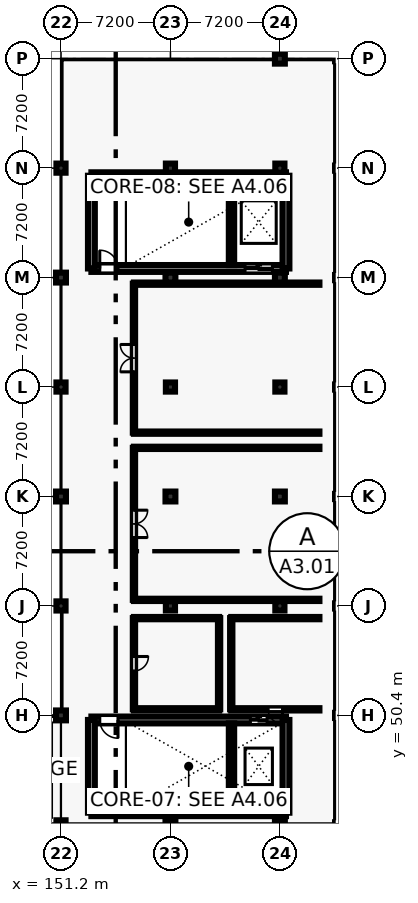
"""IFC4 building model, lengths in metres.
Left out: names, types, materials, properties, quantities, classifications, styles, units other than length and angle.
Written with IfcOpenShell. Run it as: python <this file> out.ifc"""

import sys

from ifc_helpers import new_model, si_unit, direction, frame, frame_2d, origin, origin_2d, place, context, subcontext, project, spatial, rectangle, extrude, element, fill, save


model = new_model("IFC4")
c1 = context("Model", 3, precision=1e-05, world=origin(), true_north=direction((0.0, 1.0)))
c2 = subcontext(c1, "Body", "Model", "MODEL_VIEW")
j1 = project(units=[si_unit("LENGTHUNIT", "METRE"), si_unit("PLANEANGLEUNIT", "RADIAN")], contexts=[c1])
p1 = place(None, origin())
s1 = spatial("IfcSite", under=j1, at=p1, CompositionType="ELEMENT")
p2 = place(p1, origin())
s2 = spatial("IfcBuilding", under=s1, at=p2, CompositionType="ELEMENT")
p3 = place(p2, frame((0.0, 0.0, 13.8)))
s3 = spatial("IfcBuildingStorey", under=s2, at=p3, CompositionType="ELEMENT", Elevation=13.8)
p4 = place(p3, frame((151.2, 43.2, 0.0), z_axis=(0.0, 0.0, 1.0), x_axis=(1.0, 0.0, 0.0)))
e1 = element("IfcColumn", 1, at=p4, inside=s3, PredefinedType="COLUMN", context=c2, shape_type="SweptSolid", body=[
    extrude(rectangle(XDim=0.6, YDim=0.6, at=origin_2d()), origin(), (0.0, 0.0, 1.0), 4.8),
])
p5 = place(p3, frame((151.2, 50.4, 0.0), z_axis=(0.0, 0.0, 1.0), x_axis=(1.0, 0.0, 0.0)))
e2 = element("IfcColumn", 2, at=p5, inside=s3, PredefinedType="COLUMN", context=c2, shape_type="SweptSolid", body=[
    extrude(rectangle(XDim=0.65, YDim=0.65, at=origin_2d()), origin(), (0.0, 0.0, 1.0), 4.8),
])
p6 = place(p3, frame((151.2, 57.6, 0.0), z_axis=(0.0, 0.0, 1.0), x_axis=(1.0, 0.0, 0.0)))
e3 = element("IfcColumn", 3, at=p6, inside=s3, PredefinedType="COLUMN", context=c2, shape_type="SweptSolid", body=[
    extrude(rectangle(XDim=0.6, YDim=0.6, at=origin_2d()), origin(), (0.0, 0.0, 1.0), 4.8),
])
p7 = place(p3, frame((151.2, 64.8, 0.0), z_axis=(0.0, 0.0, 1.0), x_axis=(1.0, 0.0, 0.0)))
e4 = element("IfcColumn", 4, at=p7, inside=s3, PredefinedType="COLUMN", context=c2, shape_type="SweptSolid", body=[
    extrude(rectangle(XDim=0.65, YDim=0.65, at=origin_2d()), origin(), (0.0, 0.0, 1.0), 4.8),
])
p8 = place(p3, frame((151.2, 72.0, 0.0), z_axis=(0.0, 0.0, 1.0), x_axis=(1.0, 0.0, 0.0)))
e5 = element("IfcColumn", 5, at=p8, inside=s3, PredefinedType="COLUMN", context=c2, shape_type="SweptSolid", body=[
    extrude(rectangle(XDim=0.6, YDim=0.6, at=origin_2d()), origin(), (0.0, 0.0, 1.0), 4.8),
])
p9 = place(p3, frame((151.2, 79.2, 0.0), z_axis=(0.0, 0.0, 1.0), x_axis=(1.0, 0.0, 0.0)))
e6 = element("IfcColumn", 6, at=p9, inside=s3, PredefinedType="COLUMN", context=c2, shape_type="SweptSolid", body=[
    extrude(rectangle(XDim=0.65, YDim=0.65, at=origin_2d()), origin(), (0.0, 0.0, 1.0), 4.8),
])
p10 = place(p3, frame((151.2, 86.4, 0.0), z_axis=(0.0, 0.0, 1.0), x_axis=(1.0, 0.0, 0.0)))
e7 = element("IfcColumn", 7, at=p10, inside=s3, PredefinedType="COLUMN", context=c2, shape_type="SweptSolid", body=[
    extrude(rectangle(XDim=0.6, YDim=0.6, at=origin_2d()), origin(), (0.0, 0.0, 1.0), 4.8),
])
p11 = place(p3, frame((158.4, 43.2, 0.0), z_axis=(0.0, 0.0, 1.0), x_axis=(1.0, 0.0, 0.0)))
e8 = element("IfcColumn", 8, at=p11, inside=s3, PredefinedType="COLUMN", context=c2, shape_type="SweptSolid", body=[
    extrude(rectangle(XDim=0.65, YDim=0.65, at=origin_2d()), origin(), (0.0, 0.0, 1.0), 4.8),
])
p12 = place(p3, frame((158.4, 57.6, 0.0), z_axis=(0.0, 0.0, 1.0), x_axis=(1.0, 0.0, 0.0)))
e9 = element("IfcColumn", 9, at=p12, inside=s3, PredefinedType="COLUMN", context=c2, shape_type="SweptSolid", body=[
    extrude(rectangle(XDim=0.6, YDim=0.6, at=origin_2d()), origin(), (0.0, 0.0, 1.0), 4.8),
])
p13 = place(p3, frame((158.4, 64.8, 0.0), z_axis=(0.0, 0.0, 1.0), x_axis=(1.0, 0.0, 0.0)))
e10 = element("IfcColumn", 10, at=p13, inside=s3, PredefinedType="COLUMN", context=c2, shape_type="SweptSolid", body=[
    extrude(rectangle(XDim=0.65, YDim=0.65, at=origin_2d()), origin(), (0.0, 0.0, 1.0), 4.8),
])
p14 = place(p3, frame((158.4, 72.0, 0.0), z_axis=(0.0, 0.0, 1.0), x_axis=(1.0, 0.0, 0.0)))
e11 = element("IfcColumn", 11, at=p14, inside=s3, PredefinedType="COLUMN", context=c2, shape_type="SweptSolid", body=[
    extrude(rectangle(XDim=0.6, YDim=0.6, at=origin_2d()), origin(), (0.0, 0.0, 1.0), 4.8),
])
p15 = place(p3, frame((158.4, 79.2, 0.0), z_axis=(0.0, 0.0, 1.0), x_axis=(1.0, 0.0, 0.0)))
e12 = element("IfcColumn", 12, at=p15, inside=s3, PredefinedType="COLUMN", context=c2, shape_type="SweptSolid", body=[
    extrude(rectangle(XDim=0.65, YDim=0.65, at=origin_2d()), origin(), (0.0, 0.0, 1.0), 4.8),
])
p16 = place(p3, frame((158.4, 86.4, 0.0), z_axis=(0.0, 0.0, 1.0), x_axis=(1.0, 0.0, 0.0)))
e13 = element("IfcColumn", 13, at=p16, inside=s3, PredefinedType="COLUMN", context=c2, shape_type="SweptSolid", body=[
    extrude(rectangle(XDim=0.6, YDim=0.6, at=origin_2d()), origin(), (0.0, 0.0, 1.0), 4.8),
])
p17 = place(p3, frame((165.6, 43.2, 0.0), z_axis=(0.0, 0.0, 1.0), x_axis=(1.0, 0.0, 0.0)))
e14 = element("IfcColumn", 14, at=p17, inside=s3, PredefinedType="COLUMN", context=c2, shape_type="SweptSolid", body=[
    extrude(rectangle(XDim=0.65, YDim=0.65, at=origin_2d()), origin(), (0.0, 0.0, 1.0), 4.8),
])
p18 = place(p3, frame((165.6, 57.6, 0.0), z_axis=(0.0, 0.0, 1.0), x_axis=(1.0, 0.0, 0.0)))
e15 = element("IfcColumn", 15, at=p18, inside=s3, PredefinedType="COLUMN", context=c2, shape_type="SweptSolid", body=[
    extrude(rectangle(XDim=0.6, YDim=0.6, at=origin_2d()), origin(), (0.0, 0.0, 1.0), 4.8),
])
p19 = place(p3, frame((165.6, 64.8, 0.0), z_axis=(0.0, 0.0, 1.0), x_axis=(1.0, 0.0, 0.0)))
e16 = element("IfcColumn", 16, at=p19, inside=s3, PredefinedType="COLUMN", context=c2, shape_type="SweptSolid", body=[
    extrude(rectangle(XDim=0.65, YDim=0.65, at=origin_2d()), origin(), (0.0, 0.0, 1.0), 4.8),
])
p20 = place(p3, frame((165.6, 72.0, 0.0), z_axis=(0.0, 0.0, 1.0), x_axis=(1.0, 0.0, 0.0)))
e17 = element("IfcColumn", 17, at=p20, inside=s3, PredefinedType="COLUMN", context=c2, shape_type="SweptSolid", body=[
    extrude(rectangle(XDim=0.6, YDim=0.6, at=origin_2d()), origin(), (0.0, 0.0, 1.0), 4.8),
])
p21 = place(p3, frame((165.6, 79.2, 0.0), z_axis=(0.0, 0.0, 1.0), x_axis=(1.0, 0.0, 0.0)))
e18 = element("IfcColumn", 18, at=p21, inside=s3, PredefinedType="COLUMN", context=c2, shape_type="SweptSolid", body=[
    extrude(rectangle(XDim=0.65, YDim=0.65, at=origin_2d()), origin(), (0.0, 0.0, 1.0), 4.8),
])
p22 = place(p3, frame((165.6, 86.4, 0.0), z_axis=(0.0, 0.0, 1.0), x_axis=(1.0, 0.0, 0.0)))
e19 = element("IfcColumn", 19, at=p22, inside=s3, PredefinedType="COLUMN", context=c2, shape_type="SweptSolid", body=[
    extrude(rectangle(XDim=0.6, YDim=0.6, at=origin_2d()), origin(), (0.0, 0.0, 1.0), 4.8),
])
p23 = place(p3, frame((165.6, 93.6, 0.0), z_axis=(0.0, 0.0, 1.0), x_axis=(1.0, 0.0, 0.0)))
e20 = element("IfcColumn", 20, at=p23, inside=s3, PredefinedType="COLUMN", context=c2, shape_type="SweptSolid", body=[
    extrude(rectangle(XDim=0.65, YDim=0.65, at=origin_2d()), origin(), (0.0, 0.0, 1.0), 4.8),
])
p24 = place(p3, frame((153.2, 44.0, 0.0), z_axis=(0.0, 0.0, 1.0), x_axis=(1.0, 0.0, 0.0)))
e21 = element("IfcWall", 21, at=p24, inside=s3, PredefinedType="SHEAR", context=c2, shape_type="SweptSolid", body=[
    extrude(rectangle(XDim=12.8, YDim=0.45, at=frame_2d((6.4, 0.0))), origin(), (0.0, 0.0, 1.0), 4.53),
])
p25 = place(p3, frame((153.2, 50.1, 0.0), z_axis=(0.0, 0.0, 1.0), x_axis=(1.0, 0.0, 0.0)))
e22 = element("IfcWall", 22, at=p25, inside=s3, PredefinedType="SHEAR", context=c2, shape_type="SweptSolid", body=[
    extrude(rectangle(XDim=12.8, YDim=0.45, at=frame_2d((6.4, 0.0))), origin(), (0.0, 0.0, 1.0), 4.53),
])
p26 = place(p25, frame((0.55, 0.0, 0.0)))
e23 = element("IfcOpeningElement", 23, at=p26, cuts=e22, PredefinedType="OPENING", context=c2, shape_type="SweptSolid", body=[
    extrude(rectangle(XDim=1.2, YDim=2.25, at=frame_2d((0.6, 1.125))), frame((0.0, 0.235, 0.0), z_axis=(0.0, -1.0, 0.0), x_axis=(1.0, 0.0, 0.0)), (0.0, 0.0, 1.0), 0.47),
])
p27 = place(p25, frame((10.458, 0.0, 0.0)))
e24 = element("IfcOpeningElement", 24, at=p27, cuts=e22, PredefinedType="OPENING", context=c2, shape_type="SweptSolid", body=[
    extrude(rectangle(XDim=1.1, YDim=2.2, at=frame_2d((0.55, 1.1))), frame((0.0, 0.235, 0.0), z_axis=(0.0, -1.0, 0.0), x_axis=(1.0, 0.0, 0.0)), (0.0, 0.0, 1.0), 0.47),
])
for number, where, z_axis, x_axis in (
    (25, (153.2, 44.0, 0.0), (0.0, 0.0, 1.0), (0.0, 1.0, 0.0)),
    (26, (166.0, 44.0, 0.0), (0.0, 0.0, 1.0), (0.0, 1.0, 0.0)),
):
    element("IfcWall", number, at=place(p3, frame(where, z_axis=z_axis, x_axis=x_axis)), inside=s3, PredefinedType="SHEAR", context=c2, shape_type="SweptSolid", body=[
        extrude(rectangle(XDim=6.1, YDim=0.45, at=frame_2d((3.05, 0.0))), origin(), (0.0, 0.0, 1.0), 4.53),
    ])
p28 = place(p3, frame((162.416, 44.225, 0.0), z_axis=(0.0, 0.0, 1.0), x_axis=(0.0, 1.0, 0.0)))
e27 = element("IfcWall", 27, at=p28, inside=s3, PredefinedType="SHEAR", context=c2, shape_type="SweptSolid", body=[
    extrude(rectangle(XDim=5.65, YDim=0.35, at=frame_2d((2.825, 0.0))), origin(), (0.0, 0.0, 1.0), 4.53),
])
p29 = place(p3, frame((153.2, 79.8, 0.0), z_axis=(0.0, 0.0, 1.0), x_axis=(1.0, 0.0, 0.0)))
e28 = element("IfcWall", 28, at=p29, inside=s3, PredefinedType="SHEAR", context=c2, shape_type="SweptSolid", body=[
    extrude(rectangle(XDim=12.8, YDim=0.45, at=frame_2d((6.4, 0.0))), origin(), (0.0, 0.0, 1.0), 4.53),
])
p30 = place(p29, frame((0.55, 0.0, 0.0)))
e29 = element("IfcOpeningElement", 29, at=p30, cuts=e28, PredefinedType="OPENING", context=c2, shape_type="SweptSolid", body=[
    extrude(rectangle(XDim=1.2, YDim=2.25, at=frame_2d((0.6, 1.125))), frame((0.0, 0.235, 0.0), z_axis=(0.0, -1.0, 0.0), x_axis=(1.0, 0.0, 0.0)), (0.0, 0.0, 1.0), 0.47),
])
p31 = place(p29, frame((10.108, 0.0, 0.0)))
e30 = element("IfcOpeningElement", 30, at=p31, cuts=e28, PredefinedType="OPENING", context=c2, shape_type="SweptSolid", body=[
    extrude(rectangle(XDim=1.8, YDim=2.4, at=frame_2d((0.9, 1.2))), frame((0.0, 0.235, 0.0), z_axis=(0.0, -1.0, 0.0), x_axis=(1.0, 0.0, 0.0)), (0.0, 0.0, 1.0), 0.47),
])
p32 = place(p3, frame((153.2, 85.9, 0.0), z_axis=(0.0, 0.0, 1.0), x_axis=(1.0, 0.0, 0.0)))
e31 = element("IfcWall", 31, at=p32, inside=s3, PredefinedType="SHEAR", context=c2, shape_type="SweptSolid", body=[
    extrude(rectangle(XDim=12.8, YDim=0.45, at=frame_2d((6.4, 0.0))), origin(), (0.0, 0.0, 1.0), 4.53),
])
for number, where, z_axis, x_axis in (
    (32, (153.2, 79.8, 0.0), (0.0, 0.0, 1.0), (0.0, 1.0, 0.0)),
    (33, (166.0, 79.8, 0.0), (0.0, 0.0, 1.0), (0.0, 1.0, 0.0)),
):
    element("IfcWall", number, at=place(p3, frame(where, z_axis=z_axis, x_axis=x_axis)), inside=s3, PredefinedType="SHEAR", context=c2, shape_type="SweptSolid", body=[
        extrude(rectangle(XDim=6.1, YDim=0.45, at=frame_2d((3.05, 0.0))), origin(), (0.0, 0.0, 1.0), 4.53),
    ])
p33 = place(p3, frame((162.416, 80.025, 0.0), z_axis=(0.0, 0.0, 1.0), x_axis=(0.0, 1.0, 0.0)))
e34 = element("IfcWall", 34, at=p33, inside=s3, PredefinedType="SHEAR", context=c2, shape_type="SweptSolid", body=[
    extrude(rectangle(XDim=5.65, YDim=0.35, at=frame_2d((2.825, 0.0))), origin(), (0.0, 0.0, 1.0), 4.53),
])
for number, where, z_axis, x_axis in (
    (35, (156.0, 58.0, 0.0), (0.0, 0.0, 1.0), (1.0, 0.0, 0.0)),
    (36, (168.2, 68.0, 0.0), (0.0, 0.0, 1.0), (-1.0, 0.0, 0.0)),
):
    element("IfcWall", number, at=place(p3, frame(where, z_axis=z_axis, x_axis=x_axis)), inside=s3, PredefinedType="PARTITIONING", context=c2, shape_type="SweptSolid", body=[
        extrude(rectangle(XDim=12.2, YDim=0.15, at=frame_2d((6.1, 0.0))), origin(), (0.0, 0.0, 1.0), 3.59),
    ])
p34 = place(p3, frame((156.0, 68.0, 0.0), z_axis=(0.0, 0.0, 1.0), x_axis=(0.0, -1.0, 0.0)))
e37 = element("IfcWall", 37, at=p34, inside=s3, PredefinedType="PARTITIONING", context=c2, shape_type="SweptSolid", body=[
    extrude(rectangle(XDim=10.0, YDim=0.15, at=frame_2d((5.0, 0.0))), origin(), (0.0, 0.0, 1.0), 3.59),
])
p35 = place(p34, frame((4.1, 0.0, 0.0)))
e38 = element("IfcOpeningElement", 38, at=p35, cuts=e37, PredefinedType="OPENING", context=c2, shape_type="SweptSolid", body=[
    extrude(rectangle(XDim=1.8, YDim=2.3, at=frame_2d((0.9, 1.15))), frame((0.0, 0.085, 0.0), z_axis=(0.0, -1.0, 0.0), x_axis=(1.0, 0.0, 0.0)), (0.0, 0.0, 1.0), 0.17),
])
for number, where, z_axis, x_axis in (
    (39, (156.0, 69.0, 0.0), (0.0, 0.0, 1.0), (1.0, 0.0, 0.0)),
    (40, (168.2, 78.8, 0.0), (0.0, 0.0, 1.0), (-1.0, 0.0, 0.0)),
):
    element("IfcWall", number, at=place(p3, frame(where, z_axis=z_axis, x_axis=x_axis)), inside=s3, PredefinedType="PARTITIONING", context=c2, shape_type="SweptSolid", body=[
        extrude(rectangle(XDim=12.2, YDim=0.15, at=frame_2d((6.1, 0.0))), origin(), (0.0, 0.0, 1.0), 3.59),
    ])
p36 = place(p3, frame((156.0, 78.8, 0.0), z_axis=(0.0, 0.0, 1.0), x_axis=(0.0, -1.0, 0.0)))
e41 = element("IfcWall", 41, at=p36, inside=s3, PredefinedType="PARTITIONING", context=c2, shape_type="SweptSolid", body=[
    extrude(rectangle(XDim=9.8, YDim=0.15, at=frame_2d((4.9, 0.0))), origin(), (0.0, 0.0, 1.0), 3.59),
])
p37 = place(p36, frame((4.0, 0.0, 0.0)))
e42 = element("IfcOpeningElement", 42, at=p37, cuts=e41, PredefinedType="OPENING", context=c2, shape_type="SweptSolid", body=[
    extrude(rectangle(XDim=1.8, YDim=2.3, at=frame_2d((0.9, 1.15))), frame((0.0, 0.085, 0.0), z_axis=(0.0, -1.0, 0.0), x_axis=(1.0, 0.0, 0.0)), (0.0, 0.0, 1.0), 0.17),
])
p38 = place(p3, frame((156.0, 50.8, 0.0), z_axis=(0.0, 0.0, 1.0), x_axis=(1.0, 0.0, 0.0)))
e43 = element("IfcWall", 43, at=p38, inside=s3, PredefinedType="PARTITIONING", context=c2, shape_type="SweptSolid", body=[
    extrude(rectangle(XDim=5.6, YDim=0.15, at=frame_2d((2.8, 0.0))), origin(), (0.0, 0.0, 1.0), 3.59),
])
p39 = place(p3, frame((161.6, 50.8, 0.0), z_axis=(0.0, 0.0, 1.0), x_axis=(0.0, 1.0, 0.0)))
e44 = element("IfcWall", 44, at=p39, inside=s3, PredefinedType="PARTITIONING", context=c2, shape_type="SweptSolid", body=[
    extrude(rectangle(XDim=6.0, YDim=0.15, at=frame_2d((3.0, 0.0))), origin(), (0.0, 0.0, 1.0), 3.59),
])
p40 = place(p3, frame((161.6, 56.8, 0.0), z_axis=(0.0, 0.0, 1.0), x_axis=(-1.0, 0.0, 0.0)))
e45 = element("IfcWall", 45, at=p40, inside=s3, PredefinedType="PARTITIONING", context=c2, shape_type="SweptSolid", body=[
    extrude(rectangle(XDim=5.6, YDim=0.15, at=frame_2d((2.8, 0.0))), origin(), (0.0, 0.0, 1.0), 3.59),
])
p41 = place(p3, frame((156.0, 56.8, 0.0), z_axis=(0.0, 0.0, 1.0), x_axis=(0.0, -1.0, 0.0)))
e46 = element("IfcWall", 46, at=p41, inside=s3, PredefinedType="PARTITIONING", context=c2, shape_type="SweptSolid", body=[
    extrude(rectangle(XDim=6.0, YDim=0.15, at=frame_2d((3.0, 0.0))), origin(), (0.0, 0.0, 1.0), 3.59),
])
p42 = place(p41, frame((2.525, 0.0, 0.0)))
e47 = element("IfcOpeningElement", 47, at=p42, cuts=e46, PredefinedType="OPENING", context=c2, shape_type="SweptSolid", body=[
    extrude(rectangle(XDim=0.95, YDim=2.15, at=frame_2d((0.475, 1.075))), frame((0.0, 0.085, 0.0), z_axis=(0.0, -1.0, 0.0), x_axis=(1.0, 0.0, 0.0)), (0.0, 0.0, 1.0), 0.17),
])
p43 = place(p3, frame((162.4, 50.8, 0.0), z_axis=(0.0, 0.0, 1.0), x_axis=(1.0, 0.0, 0.0)))
e48 = element("IfcWall", 48, at=p43, inside=s3, PredefinedType="PARTITIONING", context=c2, shape_type="SweptSolid", body=[
    extrude(rectangle(XDim=5.8, YDim=0.15, at=frame_2d((2.9, 0.0))), origin(), (0.0, 0.0, 1.0), 3.59),
])
p44 = place(p43, frame((2.425, 0.0, 0.0)))
e49 = element("IfcOpeningElement", 49, at=p44, cuts=e48, PredefinedType="OPENING", context=c2, shape_type="SweptSolid", body=[
    extrude(rectangle(XDim=0.95, YDim=2.15, at=frame_2d((0.475, 1.075))), frame((0.0, 0.085, 0.0), z_axis=(0.0, -1.0, 0.0), x_axis=(1.0, 0.0, 0.0)), (0.0, 0.0, 1.0), 0.17),
])
p45 = place(p3, frame((168.2, 56.8, 0.0), z_axis=(0.0, 0.0, 1.0), x_axis=(-1.0, 0.0, 0.0)))
e50 = element("IfcWall", 50, at=p45, inside=s3, PredefinedType="PARTITIONING", context=c2, shape_type="SweptSolid", body=[
    extrude(rectangle(XDim=5.8, YDim=0.15, at=frame_2d((2.9, 0.0))), origin(), (0.0, 0.0, 1.0), 3.59),
])
p46 = place(p3, frame((162.4, 56.8, 0.0), z_axis=(0.0, 0.0, 1.0), x_axis=(0.0, -1.0, 0.0)))
e51 = element("IfcWall", 51, at=p46, inside=s3, PredefinedType="PARTITIONING", context=c2, shape_type="SweptSolid", body=[
    extrude(rectangle(XDim=6.0, YDim=0.15, at=frame_2d((3.0, 0.0))), origin(), (0.0, 0.0, 1.0), 3.59),
])
p47 = place(p26, frame((1.2, 0.0, 0.0), z_axis=(0.0, 0.0, 1.0), x_axis=(-1.0, 0.0, 0.0)))
e52 = element("IfcDoor", 52, at=p47, inside=s3, OperationType="SINGLE_SWING_RIGHT", PredefinedType="DOOR", context=c2, shape_type="SweptSolid", body=[
    extrude(rectangle(XDim=1.2, YDim=2.25, at=frame_2d((0.6, 1.125))), frame((0.0, 0.025, 0.0), z_axis=(0.0, -1.0, 0.0), x_axis=(1.0, 0.0, 0.0)), (0.0, 0.0, 1.0), 0.05),
])
fill(e23, e52)
p48 = place(p27, origin())
e53 = element("IfcDoor", 53, at=p48, inside=s3, OperationType="SLIDING_TO_LEFT", PredefinedType="DOOR", context=c2, shape_type="SweptSolid", body=[
    extrude(rectangle(XDim=1.1, YDim=2.2, at=frame_2d((0.55, 1.1))), frame((0.0, 0.025, 0.0), z_axis=(0.0, -1.0, 0.0), x_axis=(1.0, 0.0, 0.0)), (0.0, 0.0, 1.0), 0.05),
])
fill(e24, e53)
p49 = place(p30, origin())
e54 = element("IfcDoor", 54, at=p49, inside=s3, OperationType="SINGLE_SWING_LEFT", PredefinedType="DOOR", context=c2, shape_type="SweptSolid", body=[
    extrude(rectangle(XDim=1.2, YDim=2.25, at=frame_2d((0.6, 1.125))), frame((0.0, 0.025, 0.0), z_axis=(0.0, -1.0, 0.0), x_axis=(1.0, 0.0, 0.0)), (0.0, 0.0, 1.0), 0.05),
])
fill(e29, e54)
p50 = place(p31, origin())
e55 = element("IfcDoor", 55, at=p50, inside=s3, OperationType="SLIDING_TO_LEFT", PredefinedType="DOOR", context=c2, shape_type="SweptSolid", body=[
    extrude(rectangle(XDim=1.8, YDim=2.4, at=frame_2d((0.9, 1.2))), frame((0.0, 0.025, 0.0), z_axis=(0.0, -1.0, 0.0), x_axis=(1.0, 0.0, 0.0)), (0.0, 0.0, 1.0), 0.05),
])
fill(e30, e55)
p51 = place(p35, origin())
e56 = element("IfcDoor", 56, at=p51, inside=s3, OperationType="DOUBLE_DOOR_SINGLE_SWING", PredefinedType="DOOR", context=c2, shape_type="SweptSolid", body=[
    extrude(rectangle(XDim=1.8, YDim=2.3, at=frame_2d((0.9, 1.15))), frame((0.0, 0.025, 0.0), z_axis=(0.0, -1.0, 0.0), x_axis=(1.0, 0.0, 0.0)), (0.0, 0.0, 1.0), 0.05),
])
fill(e38, e56)
p52 = place(p37, frame((1.8, 0.0, 0.0), z_axis=(0.0, 0.0, 1.0), x_axis=(-1.0, 0.0, 0.0)))
e57 = element("IfcDoor", 57, at=p52, inside=s3, OperationType="DOUBLE_DOOR_SINGLE_SWING", PredefinedType="DOOR", context=c2, shape_type="SweptSolid", body=[
    extrude(rectangle(XDim=1.8, YDim=2.3, at=frame_2d((0.9, 1.15))), frame((0.0, 0.025, 0.0), z_axis=(0.0, -1.0, 0.0), x_axis=(1.0, 0.0, 0.0)), (0.0, 0.0, 1.0), 0.05),
])
fill(e42, e57)
p53 = place(p42, origin())
e58 = element("IfcDoor", 58, at=p53, inside=s3, OperationType="SINGLE_SWING_LEFT", PredefinedType="DOOR", context=c2, shape_type="SweptSolid", body=[
    extrude(rectangle(XDim=0.95, YDim=2.15, at=frame_2d((0.475, 1.075))), frame((0.0, 0.025, 0.0), z_axis=(0.0, -1.0, 0.0), x_axis=(1.0, 0.0, 0.0)), (0.0, 0.0, 1.0), 0.05),
])
fill(e47, e58)
p54 = place(p44, frame((0.95, 0.0, 0.0), z_axis=(0.0, 0.0, 1.0), x_axis=(-1.0, 0.0, 0.0)))
e59 = element("IfcDoor", 59, at=p54, inside=s3, OperationType="SINGLE_SWING_RIGHT", PredefinedType="DOOR", context=c2, shape_type="SweptSolid", body=[
    extrude(rectangle(XDim=0.95, YDim=2.15, at=frame_2d((0.475, 1.075))), frame((0.0, 0.025, 0.0), z_axis=(0.0, -1.0, 0.0), x_axis=(1.0, 0.0, 0.0)), (0.0, 0.0, 1.0), 0.05),
])
fill(e49, e59)
save(model, sys.argv[1])
